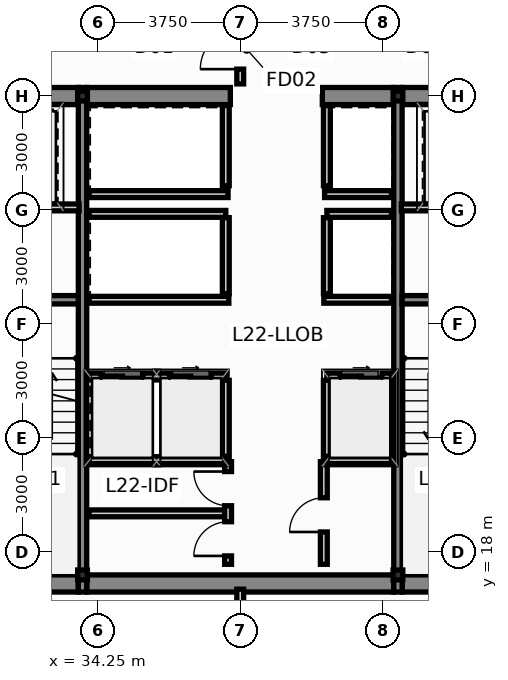
"""IFC4 building model, lengths in metres.
Left out: names, types, materials, properties, quantities, classifications, styles, units other than length and angle.
Written with IfcOpenShell. Run it as: python <this file> out.ifc"""

import sys

from ifc_helpers import new_model, si_unit, direction, frame, frame_2d, origin, origin_2d, place, context, subcontext, project, spatial, rectangle, i_section, extrude, source, transform, mapped, element, fill, save


model = new_model("IFC4")
c1 = context("Model", 3, precision=1e-05, world=origin(), true_north=direction((0.0, 1.0)))
c2 = subcontext(c1, "Body", "Model", "MODEL_VIEW")
j1 = project(units=[si_unit("LENGTHUNIT", "METRE"), si_unit("PLANEANGLEUNIT", "RADIAN")], contexts=[c1])
p1 = place(None, origin())
s1 = spatial("IfcSite", under=j1, at=p1, CompositionType="ELEMENT")
p2 = place(p1, origin())
s2 = spatial("IfcBuilding", under=s1, at=p2, CompositionType="ELEMENT")
p3 = place(p2, frame((0.0, 0.0, 87.15)))
s3 = spatial("IfcBuildingStorey", under=s2, at=p3, CompositionType="ELEMENT", Elevation=87.15)
m1 = source(origin(), c2, "Body", "SweptSolid", [
    extrude(i_section(OverallWidth=0.256, OverallDepth=0.26, WebThickness=0.01, FlangeThickness=0.017, at=origin_2d()), origin(), (0.0, 0.0, 1.0), 3.65),
])
for number, where, z_axis, x_axis in (
    (1, (33.85, 17.4, 0.0), (0.0, 0.0, 1.0), (1.0, 0.0, 0.0)),
    (2, (42.15, 17.4, 0.0), (0.0, 0.0, 1.0), (1.0, 0.0, 0.0)),
    (3, (33.85, 30.0, 0.0), (0.0, 0.0, 1.0), (1.0, 0.0, 0.0)),
    (4, (42.15, 30.0, 0.0), (0.0, 0.0, 1.0), (1.0, 0.0, 0.0)),
):
    element("IfcColumn", number, at=place(p3, frame(where, z_axis=z_axis, x_axis=x_axis)), inside=s3, PredefinedType="COLUMN", context=c2, shape_type="MappedRepresentation", body=[
        mapped(m1, transform((0.0, 0.0, 0.0), scale=1.0)),
    ])
p4 = place(p3, frame((30.84, 17.175, 0.0), z_axis=(0.0, 0.0, 1.0), x_axis=(1.0, 0.0, 0.0)))
e5 = element("IfcWall", 5, at=p4, inside=s3, PredefinedType="SHEAR", context=c2, shape_type="SweptSolid", body=[
    extrude(rectangle(XDim=2.9, YDim=0.45, at=frame_2d((1.45, 0.0))), origin(), (0.0, 0.0, 1.0), 3.65),
])
p5 = place(p3, frame((33.96, 17.175, 0.0), z_axis=(0.0, 0.0, 1.0), x_axis=(1.0, 0.0, 0.0)))
e6 = element("IfcWall", 6, at=p5, inside=s3, PredefinedType="SHEAR", context=c2, shape_type="SweptSolid", body=[
    extrude(rectangle(XDim=8.08, YDim=0.45, at=frame_2d((4.04, 0.0))), origin(), (0.0, 0.0, 1.0), 3.65),
])
for number, where, z_axis, x_axis in (
    (7, (42.26, 17.175, 0.0), (0.0, 0.0, 1.0), (1.0, 0.0, 0.0)),
    (8, (30.84, 30.0, 0.0), (0.0, 0.0, 1.0), (1.0, 0.0, 0.0)),
):
    element("IfcWall", number, at=place(p3, frame(where, z_axis=z_axis, x_axis=x_axis)), inside=s3, PredefinedType="SHEAR", context=c2, shape_type="SweptSolid", body=[
        extrude(rectangle(XDim=2.9, YDim=0.45, at=frame_2d((1.45, 0.0))), origin(), (0.0, 0.0, 1.0), 3.65),
    ])
p6 = place(p3, frame((33.96, 30.0, 0.0), z_axis=(0.0, 0.0, 1.0), x_axis=(1.0, 0.0, 0.0)))
e9 = element("IfcWall", 9, at=p6, inside=s3, PredefinedType="SHEAR", context=c2, shape_type="SweptSolid", body=[
    extrude(rectangle(XDim=3.78, YDim=0.45, at=frame_2d((1.89, 0.0))), origin(), (0.0, 0.0, 1.0), 3.65),
])
p7 = place(p3, frame((40.16, 30.0, 0.0), z_axis=(0.0, 0.0, 1.0), x_axis=(1.0, 0.0, 0.0)))
e10 = element("IfcWall", 10, at=p7, inside=s3, PredefinedType="SHEAR", context=c2, shape_type="SweptSolid", body=[
    extrude(rectangle(XDim=1.88, YDim=0.45, at=frame_2d((0.94, 0.0))), origin(), (0.0, 0.0, 1.0), 3.65),
])
p8 = place(p3, frame((42.26, 30.0, 0.0), z_axis=(0.0, 0.0, 1.0), x_axis=(1.0, 0.0, 0.0)))
e11 = element("IfcWall", 11, at=p8, inside=s3, PredefinedType="SHEAR", context=c2, shape_type="SweptSolid", body=[
    extrude(rectangle(XDim=2.9, YDim=0.45, at=frame_2d((1.45, 0.0))), origin(), (0.0, 0.0, 1.0), 3.65),
])
for number, where, z_axis, x_axis in (
    (12, (33.85, 16.95, 0.0), (0.0, 0.0, 1.0), (0.0, 1.0, 0.0)),
    (13, (42.15, 16.95, 0.0), (0.0, 0.0, 1.0), (0.0, 1.0, 0.0)),
):
    element("IfcWall", number, at=place(p3, frame(where, z_axis=z_axis, x_axis=x_axis)), inside=s3, PredefinedType="SHEAR", context=c2, shape_type="SweptSolid", body=[
        extrude(rectangle(XDim=13.275, YDim=0.22, at=frame_2d((6.638, 0.0))), origin(), (0.0, 0.0, 1.0), 3.65),
    ])
for number, where, z_axis, x_axis in (
    (14, (30.84, 24.64, 0.0), (0.0, 0.0, 1.0), (1.0, 0.0, 0.0)),
    (15, (42.26, 24.64, 0.0), (0.0, 0.0, 1.0), (1.0, 0.0, 0.0)),
):
    element("IfcWall", number, at=place(p3, frame(where, z_axis=z_axis, x_axis=x_axis)), inside=s3, PredefinedType="SHEAR", context=c2, shape_type="SweptSolid", body=[
        extrude(rectangle(XDim=2.9, YDim=0.22, at=frame_2d((1.45, 0.0))), origin(), (0.0, 0.0, 1.0), 3.65),
    ])
p9 = place(p3, frame((34.02, 22.62, 0.0), z_axis=(0.0, 0.0, 1.0), x_axis=(1.0, 0.0, 0.0)))
e16 = element("IfcWall", 16, at=p9, inside=s3, PredefinedType="PARTITIONING", context=c2, shape_type="SweptSolid", body=[
    extrude(rectangle(XDim=3.6, YDim=0.18, at=frame_2d((1.8, 0.0))), origin(), (0.0, 0.0, 1.0), 3.4),
])
p10 = place(p9, frame((0.32, 0.0, 0.0)))
e17 = element("IfcOpeningElement", 17, at=p10, cuts=e16, PredefinedType="OPENING", context=c2, shape_type="SweptSolid", body=[
    extrude(rectangle(XDim=1.1, YDim=2.2, at=frame_2d((0.55, 1.1))), frame((0.0, 0.102, 0.0), z_axis=(0.0, -1.0, 0.0), x_axis=(1.0, 0.0, 0.0)), (0.0, 0.0, 1.0), 0.204),
])
p11 = place(p9, frame((2.12, 0.0, 0.0)))
e18 = element("IfcOpeningElement", 18, at=p11, cuts=e16, PredefinedType="OPENING", context=c2, shape_type="SweptSolid", body=[
    extrude(rectangle(XDim=1.1, YDim=2.2, at=frame_2d((0.55, 1.1))), frame((0.0, 0.102, 0.0), z_axis=(0.0, -1.0, 0.0), x_axis=(1.0, 0.0, 0.0)), (0.0, 0.0, 1.0), 0.204),
])
p12 = place(p3, frame((40.28, 22.62, 0.0), z_axis=(0.0, 0.0, 1.0), x_axis=(1.0, 0.0, 0.0)))
e19 = element("IfcWall", 19, at=p12, inside=s3, PredefinedType="PARTITIONING", context=c2, shape_type="SweptSolid", body=[
    extrude(rectangle(XDim=1.7, YDim=0.18, at=frame_2d((0.85, 0.0))), origin(), (0.0, 0.0, 1.0), 3.4),
])
p13 = place(p12, frame((0.35, 0.0, 0.0)))
e20 = element("IfcOpeningElement", 20, at=p13, cuts=e19, PredefinedType="OPENING", context=c2, shape_type="SweptSolid", body=[
    extrude(rectangle(XDim=1.1, YDim=2.2, at=frame_2d((0.55, 1.1))), frame((0.0, 0.102, 0.0), z_axis=(0.0, -1.0, 0.0), x_axis=(1.0, 0.0, 0.0)), (0.0, 0.0, 1.0), 0.204),
])
for number, where, z_axis, x_axis in (
    (21, (37.62, 20.52, 0.0), (0.0, 0.0, 1.0), (0.0, 1.0, 0.0)),
    (22, (40.28, 20.52, 0.0), (0.0, 0.0, 1.0), (0.0, 1.0, 0.0)),
):
    element("IfcWall", number, at=place(p3, frame(where, z_axis=z_axis, x_axis=x_axis)), inside=s3, PredefinedType="PARTITIONING", context=c2, shape_type="SweptSolid", body=[
        extrude(rectangle(XDim=2.0, YDim=0.18, at=frame_2d((1.0, 0.0))), origin(), (0.0, 0.0, 1.0), 3.4),
    ])
p14 = place(p3, frame((34.02, 26.9, 0.0), z_axis=(0.0, 0.0, 1.0), x_axis=(1.0, 0.0, 0.0)))
e23 = element("IfcWall", 23, at=p14, inside=s3, PredefinedType="PARTITIONING", context=c2, shape_type="SweptSolid", body=[
    extrude(rectangle(XDim=3.6, YDim=0.18, at=frame_2d((1.8, 0.0))), origin(), (0.0, 0.0, 1.0), 3.4),
])
p15 = place(p3, frame((40.28, 26.9, 0.0), z_axis=(0.0, 0.0, 1.0), x_axis=(1.0, 0.0, 0.0)))
e24 = element("IfcWall", 24, at=p15, inside=s3, PredefinedType="PARTITIONING", context=c2, shape_type="SweptSolid", body=[
    extrude(rectangle(XDim=1.7, YDim=0.18, at=frame_2d((0.85, 0.0))), origin(), (0.0, 0.0, 1.0), 3.4),
])
for number, where, z_axis, x_axis in (
    (25, (37.62, 24.8, 0.0), (0.0, 0.0, 1.0), (0.0, 1.0, 0.0)),
    (26, (40.28, 24.8, 0.0), (0.0, 0.0, 1.0), (0.0, 1.0, 0.0)),
):
    element("IfcWall", number, at=place(p3, frame(where, z_axis=z_axis, x_axis=x_axis)), inside=s3, PredefinedType="PARTITIONING", context=c2, shape_type="SweptSolid", body=[
        extrude(rectangle(XDim=2.0, YDim=0.18, at=frame_2d((1.0, 0.0))), origin(), (0.0, 0.0, 1.0), 3.4),
    ])
p16 = place(p3, frame((34.02, 24.64, 0.0), z_axis=(0.0, 0.0, 1.0), x_axis=(1.0, 0.0, 0.0)))
e27 = element("IfcWall", 27, at=p16, inside=s3, PredefinedType="PARTITIONING", context=c2, shape_type="SweptSolid", body=[
    extrude(rectangle(XDim=3.68, YDim=0.18, at=frame_2d((1.84, 0.0))), origin(), (0.0, 0.0, 1.0), 3.4),
])
p17 = place(p3, frame((40.2, 24.64, 0.0), z_axis=(0.0, 0.0, 1.0), x_axis=(1.0, 0.0, 0.0)))
e28 = element("IfcWall", 28, at=p17, inside=s3, PredefinedType="PARTITIONING", context=c2, shape_type="SweptSolid", body=[
    extrude(rectangle(XDim=1.78, YDim=0.18, at=frame_2d((0.89, 0.0))), origin(), (0.0, 0.0, 1.0), 3.4),
])
p18 = place(p3, frame((34.02, 27.42, 0.0), z_axis=(0.0, 0.0, 1.0), x_axis=(1.0, 0.0, 0.0)))
e29 = element("IfcWall", 29, at=p18, inside=s3, PredefinedType="PARTITIONING", context=c2, shape_type="SweptSolid", body=[
    extrude(rectangle(XDim=3.66, YDim=0.18, at=frame_2d((1.83, 0.0))), origin(), (0.0, 0.0, 1.0), 3.4),
])
p19 = place(p3, frame((40.22, 27.42, 0.0), z_axis=(0.0, 0.0, 1.0), x_axis=(1.0, 0.0, 0.0)))
e30 = element("IfcWall", 30, at=p19, inside=s3, PredefinedType="PARTITIONING", context=c2, shape_type="SweptSolid", body=[
    extrude(rectangle(XDim=1.76, YDim=0.18, at=frame_2d((0.88, 0.0))), origin(), (0.0, 0.0, 1.0), 3.4),
])
for number, where, z_axis, x_axis in (
    (31, (37.62, 27.64, 0.0), (0.0, 0.0, 1.0), (0.0, 1.0, 0.0)),
    (32, (40.28, 27.64, 0.0), (0.0, 0.0, 1.0), (0.0, 1.0, 0.0)),
):
    element("IfcWall", number, at=place(p3, frame(where, z_axis=z_axis, x_axis=x_axis)), inside=s3, PredefinedType="PARTITIONING", context=c2, shape_type="SweptSolid", body=[
        extrude(rectangle(XDim=2.11, YDim=0.18, at=frame_2d((1.055, 0.0))), origin(), (0.0, 0.0, 1.0), 3.4),
    ])
for number, where, z_axis, x_axis in (
    (33, (30.86, 27.07, 0.0), (0.0, 0.0, 1.0), (1.0, 0.0, 0.0)),
    (34, (42.24, 27.07, 0.0), (0.0, 0.0, 1.0), (1.0, 0.0, 0.0)),
):
    element("IfcWall", number, at=place(p3, frame(where, z_axis=z_axis, x_axis=x_axis)), inside=s3, PredefinedType="PARTITIONING", context=c2, shape_type="SweptSolid", body=[
        extrude(rectangle(XDim=2.9, YDim=0.18, at=frame_2d((1.45, 0.0))), origin(), (0.0, 0.0, 1.0), 3.4),
    ])
p20 = place(p3, frame((34.02, 20.42, 0.0), z_axis=(0.0, 0.0, 1.0), x_axis=(1.0, 0.0, 0.0)))
e35 = element("IfcWall", 35, at=p20, inside=s3, PredefinedType="PARTITIONING", context=c2, shape_type="SweptSolid", body=[
    extrude(rectangle(XDim=3.64, YDim=0.18, at=frame_2d((1.82, 0.0))), origin(), (0.0, 0.0, 1.0), 3.4),
])
p21 = place(p3, frame((40.22, 20.42, 0.0), z_axis=(0.0, 0.0, 1.0), x_axis=(1.0, 0.0, 0.0)))
e36 = element("IfcWall", 36, at=p21, inside=s3, PredefinedType="PARTITIONING", context=c2, shape_type="SweptSolid", body=[
    extrude(rectangle(XDim=1.76, YDim=0.18, at=frame_2d((0.88, 0.0))), origin(), (0.0, 0.0, 1.0), 3.4),
])
p22 = place(p3, frame((34.02, 19.02, 0.0), z_axis=(0.0, 0.0, 1.0), x_axis=(1.0, 0.0, 0.0)))
e37 = element("IfcWall", 37, at=p22, inside=s3, PredefinedType="PARTITIONING", context=c2, shape_type="SweptSolid", body=[
    extrude(rectangle(XDim=3.58, YDim=0.18, at=frame_2d((1.79, 0.0))), origin(), (0.0, 0.0, 1.0), 3.4),
])
p23 = place(p3, frame((37.68, 17.68, 0.0), z_axis=(0.0, 0.0, 1.0), x_axis=(0.0, 1.0, 0.0)))
e38 = element("IfcWall", 38, at=p23, inside=s3, PredefinedType="PARTITIONING", context=c2, shape_type="SweptSolid", body=[
    extrude(rectangle(XDim=2.7, YDim=0.18, at=frame_2d((1.35, 0.0))), origin(), (0.0, 0.0, 1.0), 3.4),
])
p24 = place(p23, frame((0.22, 0.0, 0.0)))
e39 = element("IfcOpeningElement", 39, at=p24, cuts=e38, PredefinedType="OPENING", context=c2, shape_type="SweptSolid", body=[
    extrude(rectangle(XDim=0.9, YDim=2.1, at=frame_2d((0.45, 1.05))), frame((0.0, 0.102, 0.0), z_axis=(0.0, -1.0, 0.0), x_axis=(1.0, 0.0, 0.0)), (0.0, 0.0, 1.0), 0.204),
])
p25 = place(p23, frame((1.54, 0.0, 0.0)))
e40 = element("IfcOpeningElement", 40, at=p25, cuts=e38, PredefinedType="OPENING", context=c2, shape_type="SweptSolid", body=[
    extrude(rectangle(XDim=0.9, YDim=2.1, at=frame_2d((0.45, 1.05))), frame((0.0, 0.102, 0.0), z_axis=(0.0, -1.0, 0.0), x_axis=(1.0, 0.0, 0.0)), (0.0, 0.0, 1.0), 0.204),
])
p26 = place(p3, frame((40.2, 17.68, 0.0), z_axis=(0.0, 0.0, 1.0), x_axis=(0.0, 1.0, 0.0)))
e41 = element("IfcWall", 41, at=p26, inside=s3, PredefinedType="PARTITIONING", context=c2, shape_type="SweptSolid", body=[
    extrude(rectangle(XDim=2.7, YDim=0.18, at=frame_2d((1.35, 0.0))), origin(), (0.0, 0.0, 1.0), 3.4),
])
p27 = place(p26, frame((0.85, 0.0, 0.0)))
e42 = element("IfcOpeningElement", 42, at=p27, cuts=e41, PredefinedType="OPENING", context=c2, shape_type="SweptSolid", body=[
    extrude(rectangle(XDim=0.9, YDim=2.1, at=frame_2d((0.45, 1.05))), frame((0.0, 0.102, 0.0), z_axis=(0.0, -1.0, 0.0), x_axis=(1.0, 0.0, 0.0)), (0.0, 0.0, 1.0), 0.204),
])
p28 = place(p3, frame((38.0, 15.205, 0.0), z_axis=(0.0, 0.0, 1.0), x_axis=(0.0, 1.0, 0.0)))
e43 = element("IfcWall", 43, at=p28, inside=s3, PredefinedType="PARTITIONING", context=c2, shape_type="SweptSolid", body=[
    extrude(rectangle(XDim=1.82, YDim=0.18, at=frame_2d((0.91, 0.0))), origin(), (0.0, 0.0, 1.0), 3.4),
])
p29 = place(p28, frame((0.385, 0.0, 0.0)))
e44 = element("IfcOpeningElement", 44, at=p29, cuts=e43, PredefinedType="OPENING", context=c2, shape_type="SweptSolid", body=[
    extrude(rectangle(XDim=1.05, YDim=2.15, at=frame_2d((0.525, 1.075))), frame((0.0, 0.102, 0.0), z_axis=(0.0, -1.0, 0.0), x_axis=(1.0, 0.0, 0.0)), (0.0, 0.0, 1.0), 0.204),
])
p30 = place(p3, frame((38.0, 30.32, 0.0), z_axis=(0.0, 0.0, 1.0), x_axis=(0.0, 1.0, 0.0)))
e45 = element("IfcWall", 45, at=p30, inside=s3, PredefinedType="PARTITIONING", context=c2, shape_type="SweptSolid", body=[
    extrude(rectangle(XDim=1.825, YDim=0.18, at=frame_2d((0.913, 0.0))), origin(), (0.0, 0.0, 1.0), 3.4),
])
p31 = place(p30, frame((0.388, 0.0, 0.0)))
e46 = element("IfcOpeningElement", 46, at=p31, cuts=e45, PredefinedType="OPENING", context=c2, shape_type="SweptSolid", body=[
    extrude(rectangle(XDim=1.05, YDim=2.15, at=frame_2d((0.525, 1.075))), frame((0.0, 0.102, 0.0), z_axis=(0.0, -1.0, 0.0), x_axis=(1.0, 0.0, 0.0)), (0.0, 0.0, 1.0), 0.204),
])
p32 = place(p10, origin())
e47 = element("IfcDoor", 47, at=p32, inside=s3, OperationType="SLIDING_TO_LEFT", PredefinedType="DOOR", context=c2, shape_type="SweptSolid", body=[
    extrude(rectangle(XDim=1.1, YDim=2.2, at=frame_2d((0.55, 1.1))), frame((0.0, 0.025, 0.0), z_axis=(0.0, -1.0, 0.0), x_axis=(1.0, 0.0, 0.0)), (0.0, 0.0, 1.0), 0.05),
])
fill(e17, e47)
p33 = place(p11, origin())
e48 = element("IfcDoor", 48, at=p33, inside=s3, OperationType="SLIDING_TO_RIGHT", PredefinedType="DOOR", context=c2, shape_type="SweptSolid", body=[
    extrude(rectangle(XDim=1.1, YDim=2.2, at=frame_2d((0.55, 1.1))), frame((0.0, 0.025, 0.0), z_axis=(0.0, -1.0, 0.0), x_axis=(1.0, 0.0, 0.0)), (0.0, 0.0, 1.0), 0.05),
])
fill(e18, e48)
p34 = place(p13, origin())
e49 = element("IfcDoor", 49, at=p34, inside=s3, OperationType="SLIDING_TO_LEFT", PredefinedType="DOOR", context=c2, shape_type="SweptSolid", body=[
    extrude(rectangle(XDim=1.1, YDim=2.2, at=frame_2d((0.55, 1.1))), frame((0.0, 0.025, 0.0), z_axis=(0.0, -1.0, 0.0), x_axis=(1.0, 0.0, 0.0)), (0.0, 0.0, 1.0), 0.05),
])
fill(e20, e49)
p35 = place(p24, origin())
e50 = element("IfcDoor", 50, at=p35, inside=s3, OperationType="SINGLE_SWING_LEFT", PredefinedType="DOOR", context=c2, shape_type="SweptSolid", body=[
    extrude(rectangle(XDim=0.9, YDim=2.1, at=frame_2d((0.45, 1.05))), frame((0.0, 0.025, 0.0), z_axis=(0.0, -1.0, 0.0), x_axis=(1.0, 0.0, 0.0)), (0.0, 0.0, 1.0), 0.05),
])
fill(e39, e50)
p36 = place(p25, origin())
e51 = element("IfcDoor", 51, at=p36, inside=s3, OperationType="SINGLE_SWING_RIGHT", PredefinedType="DOOR", context=c2, shape_type="SweptSolid", body=[
    extrude(rectangle(XDim=0.9, YDim=2.1, at=frame_2d((0.45, 1.05))), frame((0.0, 0.025, 0.0), z_axis=(0.0, -1.0, 0.0), x_axis=(1.0, 0.0, 0.0)), (0.0, 0.0, 1.0), 0.05),
])
fill(e40, e51)
p37 = place(p27, origin())
e52 = element("IfcDoor", 52, at=p37, inside=s3, OperationType="SINGLE_SWING_LEFT", PredefinedType="DOOR", context=c2, shape_type="SweptSolid", body=[
    extrude(rectangle(XDim=0.9, YDim=2.1, at=frame_2d((0.45, 1.05))), frame((0.0, 0.025, 0.0), z_axis=(0.0, -1.0, 0.0), x_axis=(1.0, 0.0, 0.0)), (0.0, 0.0, 1.0), 0.05),
])
fill(e42, e52)
p38 = place(p31, origin())
e53 = element("IfcDoor", 53, at=p38, inside=s3, OperationType="SINGLE_SWING_LEFT", PredefinedType="DOOR", context=c2, shape_type="SweptSolid", body=[
    extrude(rectangle(XDim=1.05, YDim=2.15, at=frame_2d((0.525, 1.075))), frame((0.0, 0.025, 0.0), z_axis=(0.0, -1.0, 0.0), x_axis=(1.0, 0.0, 0.0)), (0.0, 0.0, 1.0), 0.05),
])
fill(e46, e53)
save(model, sys.argv[1])
